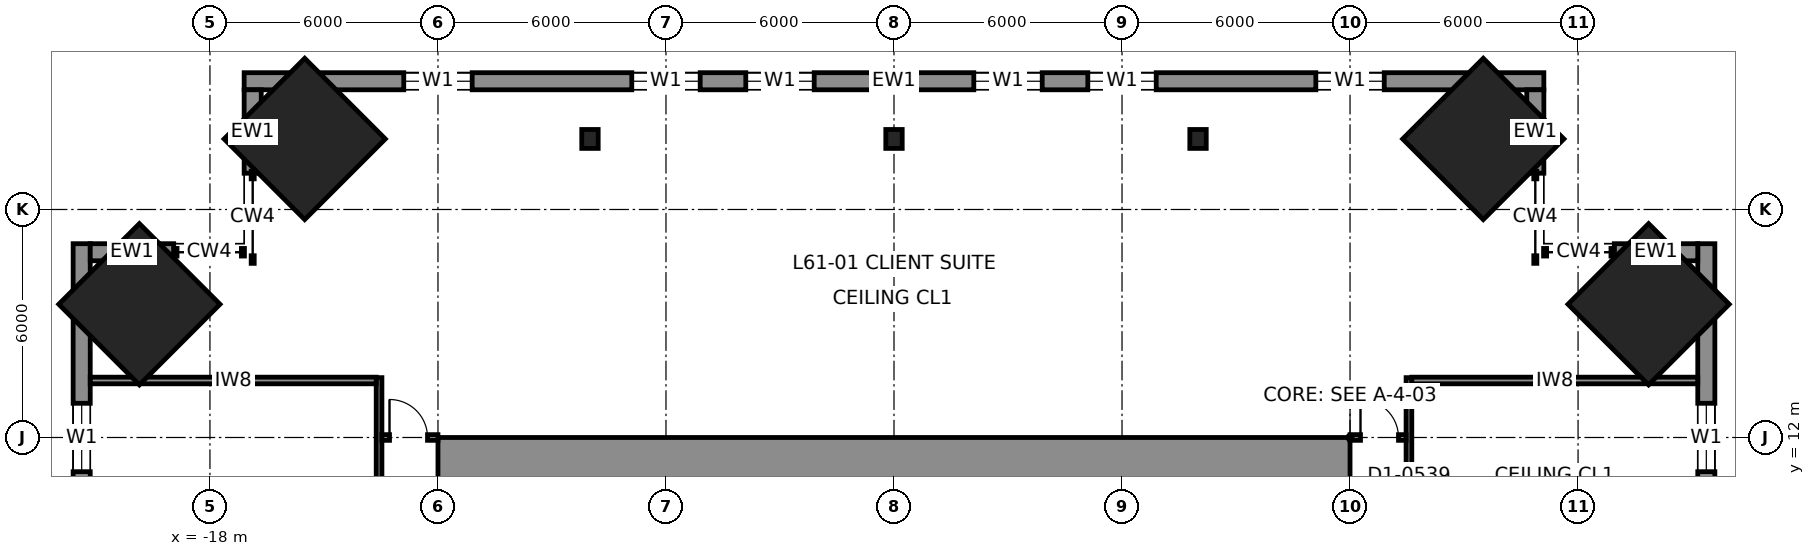
"""IFC4 building model, lengths in metres.
Left out: names, types, materials, properties, quantities, classifications, styles, units other than length and angle.
Written with IfcOpenShell. Run it as: python <this file> out.ifc"""

import sys

from ifc_helpers import new_model, si_unit, direction, frame, frame_2d, origin, origin_2d, place, context, subcontext, project, spatial, rectangle, i_section, extrude, element, fill, save


model = new_model("IFC4")
c1 = context("Model", 3, precision=1e-05, world=origin(), true_north=direction((0.0, 1.0)))
c2 = subcontext(c1, "Body", "Model", "MODEL_VIEW")
j1 = project(units=[si_unit("LENGTHUNIT", "METRE"), si_unit("PLANEANGLEUNIT", "RADIAN")], contexts=[c1])
p1 = place(None, origin())
s1 = spatial("IfcSite", under=j1, at=p1, CompositionType="ELEMENT")
p2 = place(p1, origin())
s2 = spatial("IfcBuilding", under=s1, at=p2, CompositionType="ELEMENT")
p3 = place(p2, frame((0.0, 0.0, 273.8)))
s3 = spatial("IfcBuildingStorey", under=s2, at=p3, CompositionType="ELEMENT", Elevation=273.8)
for number, where, z_axis, x_axis in (
    (1, (15.506, 19.856, 0.0), (-0.04, -0.04, 0.998), (0.708, -0.707, 0.0)),
    (2, (19.856, 15.506, 0.0), (-0.04, -0.04, 0.998), (0.707, -0.708, 0.0)),
    (3, (-19.856, 15.506, 0.0), (0.04, -0.04, 0.998), (0.707, 0.708, 0.0)),
    (4, (-15.506, 19.856, 0.0), (0.04, -0.04, 0.998), (0.708, 0.707, 0.0)),
):
    element("IfcColumn", number, at=place(p3, frame(where, z_axis=z_axis, x_axis=x_axis)), inside=s3, PredefinedType="COLUMN", context=c2, shape_type="SweptSolid", body=[
        extrude(rectangle(XDim=3.0, YDim=3.0, at=origin_2d()), origin(), (0.0, 0.0, 1.0), 4.007),
    ])
for number, where, z_axis, x_axis in (
    (5, (0.0, 19.856, 0.0), (0.0, -0.04, 0.999), (1.0, 0.0, 0.0)),
    (6, (8.0, 19.856, 0.0), (0.0, -0.04, 0.999), (1.0, 0.0, 0.0)),
    (7, (-8.0, 19.856, 0.0), (0.0, -0.04, 0.999), (1.0, 0.0, 0.0)),
):
    element("IfcColumn", number, at=place(p3, frame(where, z_axis=z_axis, x_axis=x_axis)), inside=s3, PredefinedType="COLUMN", context=c2, shape_type="SweptSolid", body=[
        extrude(i_section(OverallWidth=0.432, OverallDepth=0.498, WebThickness=0.056, FlangeThickness=0.089, at=origin_2d()), origin(), (0.0, 0.0, 1.0), 4.003),
    ])
p4 = place(p3, frame((-12.0, 11.25, 0.0), z_axis=(0.0, 0.0, 1.0), x_axis=(1.0, 0.0, 0.0)))
e8 = element("IfcWall", 8, at=p4, inside=s3, PredefinedType="SHEAR", context=c2, shape_type="SweptSolid", body=[
    extrude(rectangle(XDim=24.0, YDim=1.5, at=frame_2d((12.0, 0.0))), origin(), (0.0, 0.0, 1.0), 4.0),
])
p5 = place(p3, frame((17.1, 21.375, 0.0), z_axis=(0.0, 0.0, 1.0), x_axis=(-1.0, 0.0, 0.0)))
e9 = element("IfcWall", 9, at=p5, inside=s3, PredefinedType="SOLIDWALL", context=c2, shape_type="SweptSolid", body=[
    extrude(rectangle(XDim=34.2, YDim=0.45, at=frame_2d((17.1, 0.0))), origin(), (0.0, 0.0, 1.0), 3.83),
])
p6 = place(p5, frame((4.2, 0.0, 0.7)))
e10 = element("IfcOpeningElement", 10, at=p6, cuts=e9, PredefinedType="OPENING", context=c2, shape_type="SweptSolid", body=[
    extrude(rectangle(XDim=1.8, YDim=2.6, at=frame_2d((0.9, 1.3))), frame((0.0, 0.235, 0.0), z_axis=(0.0, -1.0, 0.0), x_axis=(1.0, 0.0, 0.0)), (0.0, 0.0, 1.0), 0.47),
])
p7 = place(p5, frame((10.2, 0.0, 0.7)))
e11 = element("IfcOpeningElement", 11, at=p7, cuts=e9, PredefinedType="OPENING", context=c2, shape_type="SweptSolid", body=[
    extrude(rectangle(XDim=1.8, YDim=2.6, at=frame_2d((0.9, 1.3))), frame((0.0, 0.235, 0.0), z_axis=(0.0, -1.0, 0.0), x_axis=(1.0, 0.0, 0.0)), (0.0, 0.0, 1.0), 0.47),
])
p8 = place(p5, frame((13.2, 0.0, 0.7)))
e12 = element("IfcOpeningElement", 12, at=p8, cuts=e9, PredefinedType="OPENING", context=c2, shape_type="SweptSolid", body=[
    extrude(rectangle(XDim=1.8, YDim=2.6, at=frame_2d((0.9, 1.3))), frame((0.0, 0.235, 0.0), z_axis=(0.0, -1.0, 0.0), x_axis=(1.0, 0.0, 0.0)), (0.0, 0.0, 1.0), 0.47),
])
p9 = place(p5, frame((19.2, 0.0, 0.7)))
e13 = element("IfcOpeningElement", 13, at=p9, cuts=e9, PredefinedType="OPENING", context=c2, shape_type="SweptSolid", body=[
    extrude(rectangle(XDim=1.8, YDim=2.6, at=frame_2d((0.9, 1.3))), frame((0.0, 0.235, 0.0), z_axis=(0.0, -1.0, 0.0), x_axis=(1.0, 0.0, 0.0)), (0.0, 0.0, 1.0), 0.47),
])
p10 = place(p5, frame((22.2, 0.0, 0.7)))
e14 = element("IfcOpeningElement", 14, at=p10, cuts=e9, PredefinedType="OPENING", context=c2, shape_type="SweptSolid", body=[
    extrude(rectangle(XDim=1.8, YDim=2.6, at=frame_2d((0.9, 1.3))), frame((0.0, 0.235, 0.0), z_axis=(0.0, -1.0, 0.0), x_axis=(1.0, 0.0, 0.0)), (0.0, 0.0, 1.0), 0.47),
])
p11 = place(p5, frame((28.2, 0.0, 0.7)))
e15 = element("IfcOpeningElement", 15, at=p11, cuts=e9, PredefinedType="OPENING", context=c2, shape_type="SweptSolid", body=[
    extrude(rectangle(XDim=1.8, YDim=2.6, at=frame_2d((0.9, 1.3))), frame((0.0, 0.235, 0.0), z_axis=(0.0, -1.0, 0.0), x_axis=(1.0, 0.0, 0.0)), (0.0, 0.0, 1.0), 0.47),
])
p12 = place(p3, frame((21.375, -17.1, 0.0), z_axis=(0.0, 0.0, 1.0), x_axis=(0.0, 1.0, 0.0)))
e16 = element("IfcWall", 16, at=p12, inside=s3, PredefinedType="SOLIDWALL", context=c2, shape_type="SweptSolid", body=[
    extrude(rectangle(XDim=34.2, YDim=0.45, at=frame_2d((17.1, 0.0))), origin(), (0.0, 0.0, 1.0), 3.83),
])
p13 = place(p12, frame((4.2, 0.0, 0.7)))
e17 = element("IfcOpeningElement", 17, at=p13, cuts=e16, PredefinedType="OPENING", context=c2, shape_type="SweptSolid", body=[
    extrude(rectangle(XDim=1.8, YDim=2.6, at=frame_2d((0.9, 1.3))), frame((0.0, 0.235, 0.0), z_axis=(0.0, -1.0, 0.0), x_axis=(1.0, 0.0, 0.0)), (0.0, 0.0, 1.0), 0.47),
])
p14 = place(p12, frame((10.2, 0.0, 0.7)))
e18 = element("IfcOpeningElement", 18, at=p14, cuts=e16, PredefinedType="OPENING", context=c2, shape_type="SweptSolid", body=[
    extrude(rectangle(XDim=1.8, YDim=2.6, at=frame_2d((0.9, 1.3))), frame((0.0, 0.235, 0.0), z_axis=(0.0, -1.0, 0.0), x_axis=(1.0, 0.0, 0.0)), (0.0, 0.0, 1.0), 0.47),
])
p15 = place(p12, frame((13.2, 0.0, 0.7)))
e19 = element("IfcOpeningElement", 19, at=p15, cuts=e16, PredefinedType="OPENING", context=c2, shape_type="SweptSolid", body=[
    extrude(rectangle(XDim=1.8, YDim=2.6, at=frame_2d((0.9, 1.3))), frame((0.0, 0.235, 0.0), z_axis=(0.0, -1.0, 0.0), x_axis=(1.0, 0.0, 0.0)), (0.0, 0.0, 1.0), 0.47),
])
p16 = place(p12, frame((19.2, 0.0, 0.7)))
e20 = element("IfcOpeningElement", 20, at=p16, cuts=e16, PredefinedType="OPENING", context=c2, shape_type="SweptSolid", body=[
    extrude(rectangle(XDim=1.8, YDim=2.6, at=frame_2d((0.9, 1.3))), frame((0.0, 0.235, 0.0), z_axis=(0.0, -1.0, 0.0), x_axis=(1.0, 0.0, 0.0)), (0.0, 0.0, 1.0), 0.47),
])
p17 = place(p12, frame((22.2, 0.0, 0.7)))
e21 = element("IfcOpeningElement", 21, at=p17, cuts=e16, PredefinedType="OPENING", context=c2, shape_type="SweptSolid", body=[
    extrude(rectangle(XDim=1.8, YDim=2.6, at=frame_2d((0.9, 1.3))), frame((0.0, 0.235, 0.0), z_axis=(0.0, -1.0, 0.0), x_axis=(1.0, 0.0, 0.0)), (0.0, 0.0, 1.0), 0.47),
])
p18 = place(p12, frame((28.2, 0.0, 0.7)))
e22 = element("IfcOpeningElement", 22, at=p18, cuts=e16, PredefinedType="OPENING", context=c2, shape_type="SweptSolid", body=[
    extrude(rectangle(XDim=1.8, YDim=2.6, at=frame_2d((0.9, 1.3))), frame((0.0, 0.235, 0.0), z_axis=(0.0, -1.0, 0.0), x_axis=(1.0, 0.0, 0.0)), (0.0, 0.0, 1.0), 0.47),
])
p19 = place(p3, frame((-21.375, 17.1, 0.0), z_axis=(0.0, 0.0, 1.0), x_axis=(0.0, -1.0, 0.0)))
e23 = element("IfcWall", 23, at=p19, inside=s3, PredefinedType="SOLIDWALL", context=c2, shape_type="SweptSolid", body=[
    extrude(rectangle(XDim=34.2, YDim=0.45, at=frame_2d((17.1, 0.0))), origin(), (0.0, 0.0, 1.0), 3.83),
])
p20 = place(p19, frame((4.2, 0.0, 0.7)))
e24 = element("IfcOpeningElement", 24, at=p20, cuts=e23, PredefinedType="OPENING", context=c2, shape_type="SweptSolid", body=[
    extrude(rectangle(XDim=1.8, YDim=2.6, at=frame_2d((0.9, 1.3))), frame((0.0, 0.235, 0.0), z_axis=(0.0, -1.0, 0.0), x_axis=(1.0, 0.0, 0.0)), (0.0, 0.0, 1.0), 0.47),
])
p21 = place(p19, frame((10.2, 0.0, 0.7)))
e25 = element("IfcOpeningElement", 25, at=p21, cuts=e23, PredefinedType="OPENING", context=c2, shape_type="SweptSolid", body=[
    extrude(rectangle(XDim=1.8, YDim=2.6, at=frame_2d((0.9, 1.3))), frame((0.0, 0.235, 0.0), z_axis=(0.0, -1.0, 0.0), x_axis=(1.0, 0.0, 0.0)), (0.0, 0.0, 1.0), 0.47),
])
p22 = place(p19, frame((13.2, 0.0, 0.7)))
e26 = element("IfcOpeningElement", 26, at=p22, cuts=e23, PredefinedType="OPENING", context=c2, shape_type="SweptSolid", body=[
    extrude(rectangle(XDim=1.8, YDim=2.6, at=frame_2d((0.9, 1.3))), frame((0.0, 0.235, 0.0), z_axis=(0.0, -1.0, 0.0), x_axis=(1.0, 0.0, 0.0)), (0.0, 0.0, 1.0), 0.47),
])
p23 = place(p19, frame((19.2, 0.0, 0.7)))
e27 = element("IfcOpeningElement", 27, at=p23, cuts=e23, PredefinedType="OPENING", context=c2, shape_type="SweptSolid", body=[
    extrude(rectangle(XDim=1.8, YDim=2.6, at=frame_2d((0.9, 1.3))), frame((0.0, 0.235, 0.0), z_axis=(0.0, -1.0, 0.0), x_axis=(1.0, 0.0, 0.0)), (0.0, 0.0, 1.0), 0.47),
])
p24 = place(p19, frame((22.2, 0.0, 0.7)))
e28 = element("IfcOpeningElement", 28, at=p24, cuts=e23, PredefinedType="OPENING", context=c2, shape_type="SweptSolid", body=[
    extrude(rectangle(XDim=1.8, YDim=2.6, at=frame_2d((0.9, 1.3))), frame((0.0, 0.235, 0.0), z_axis=(0.0, -1.0, 0.0), x_axis=(1.0, 0.0, 0.0)), (0.0, 0.0, 1.0), 0.47),
])
p25 = place(p19, frame((28.2, 0.0, 0.7)))
e29 = element("IfcOpeningElement", 29, at=p25, cuts=e23, PredefinedType="OPENING", context=c2, shape_type="SweptSolid", body=[
    extrude(rectangle(XDim=1.8, YDim=2.6, at=frame_2d((0.9, 1.3))), frame((0.0, 0.235, 0.0), z_axis=(0.0, -1.0, 0.0), x_axis=(1.0, 0.0, 0.0)), (0.0, 0.0, 1.0), 0.47),
])
for number, where, z_axis, x_axis in (
    (30, (16.875, 18.954, 0.0), (0.0, 0.0, 1.0), (0.0, 1.0, 0.0)),
    (31, (18.954, 16.875, 0.0), (0.0, 0.0, 1.0), (1.0, 0.0, 0.0)),
    (32, (-16.875, 18.954, 0.0), (0.0, 0.0, 1.0), (0.0, 1.0, 0.0)),
    (33, (-18.954, 16.875, 0.0), (0.0, 0.0, 1.0), (-1.0, 0.0, 0.0)),
):
    element("IfcWall", number, at=place(p3, frame(where, z_axis=z_axis, x_axis=x_axis)), inside=s3, PredefinedType="SOLIDWALL", context=c2, shape_type="SweptSolid", body=[
        extrude(rectangle(XDim=2.196, YDim=0.45, at=frame_2d((1.098, 0.0))), origin(), (0.0, 0.0, 1.0), 3.83),
    ])
p26 = place(p3, frame((13.55, -13.575, 0.0), z_axis=(0.0, 0.0, 1.0), x_axis=(0.0, 1.0, 0.0)))
e34 = element("IfcWall", 34, at=p26, inside=s3, PredefinedType="PARTITIONING", context=c2, shape_type="SweptSolid", body=[
    extrude(rectangle(XDim=27.15, YDim=0.15, at=frame_2d((13.575, 0.0))), origin(), (0.0, 0.0, 1.0), 3.83),
])
p27 = place(p26, frame((3.175, 0.0, 0.0)))
e35 = element("IfcOpeningElement", 35, at=p27, cuts=e34, PredefinedType="OPENING", context=c2, shape_type="SweptSolid", body=[
    extrude(rectangle(XDim=1.0, YDim=2.3, at=frame_2d((0.5, 1.15))), frame((0.0, 0.085, 0.0), z_axis=(0.0, -1.0, 0.0), x_axis=(1.0, 0.0, 0.0)), (0.0, 0.0, 1.0), 0.17),
])
p28 = place(p26, frame((6.625, 0.0, 0.0)))
e36 = element("IfcOpeningElement", 36, at=p28, cuts=e34, PredefinedType="OPENING", context=c2, shape_type="SweptSolid", body=[
    extrude(rectangle(XDim=1.0, YDim=2.3, at=frame_2d((0.5, 1.15))), frame((0.0, 0.085, 0.0), z_axis=(0.0, -1.0, 0.0), x_axis=(1.0, 0.0, 0.0)), (0.0, 0.0, 1.0), 0.17),
])
p29 = place(p26, frame((17.075, 0.0, 0.0)))
e37 = element("IfcOpeningElement", 37, at=p29, cuts=e34, PredefinedType="OPENING", context=c2, shape_type="SweptSolid", body=[
    extrude(rectangle(XDim=1.0, YDim=2.3, at=frame_2d((0.5, 1.15))), frame((0.0, 0.085, 0.0), z_axis=(0.0, -1.0, 0.0), x_axis=(1.0, 0.0, 0.0)), (0.0, 0.0, 1.0), 0.17),
])
p30 = place(p26, frame((22.975, 0.0, 0.0)))
e38 = element("IfcOpeningElement", 38, at=p30, cuts=e34, PredefinedType="OPENING", context=c2, shape_type="SweptSolid", body=[
    extrude(rectangle(XDim=1.0, YDim=2.3, at=frame_2d((0.5, 1.15))), frame((0.0, 0.085, 0.0), z_axis=(0.0, -1.0, 0.0), x_axis=(1.0, 0.0, 0.0)), (0.0, 0.0, 1.0), 0.17),
])
p31 = place(p26, frame((9.825, 0.0, 0.0)))
e39 = element("IfcOpeningElement", 39, at=p31, cuts=e34, PredefinedType="OPENING", context=c2, shape_type="SweptSolid", body=[
    extrude(rectangle(XDim=1.0, YDim=2.3, at=frame_2d((0.5, 1.15))), frame((0.0, 0.085, 0.0), z_axis=(0.0, -1.0, 0.0), x_axis=(1.0, 0.0, 0.0)), (0.0, 0.0, 1.0), 0.17),
])
p32 = place(p3, frame((-13.55, 13.575, 0.0), z_axis=(0.0, 0.0, 1.0), x_axis=(0.0, -1.0, 0.0)))
e40 = element("IfcWall", 40, at=p32, inside=s3, PredefinedType="PARTITIONING", context=c2, shape_type="SweptSolid", body=[
    extrude(rectangle(XDim=27.15, YDim=0.15, at=frame_2d((13.575, 0.0))), origin(), (0.0, 0.0, 1.0), 3.83),
])
p33 = place(p32, frame((21.225, 0.0, 0.0)))
e41 = element("IfcOpeningElement", 41, at=p33, cuts=e40, PredefinedType="OPENING", context=c2, shape_type="SweptSolid", body=[
    extrude(rectangle(XDim=1.4, YDim=2.3, at=frame_2d((0.7, 1.15))), frame((0.0, 0.085, 0.0), z_axis=(0.0, -1.0, 0.0), x_axis=(1.0, 0.0, 0.0)), (0.0, 0.0, 1.0), 0.17),
])
p34 = place(p32, frame((9.075, 0.0, 0.0)))
e42 = element("IfcOpeningElement", 42, at=p34, cuts=e40, PredefinedType="OPENING", context=c2, shape_type="SweptSolid", body=[
    extrude(rectangle(XDim=1.0, YDim=2.3, at=frame_2d((0.5, 1.15))), frame((0.0, 0.085, 0.0), z_axis=(0.0, -1.0, 0.0), x_axis=(1.0, 0.0, 0.0)), (0.0, 0.0, 1.0), 0.17),
])
p35 = place(p32, frame((16.575, 0.0, 0.0)))
e43 = element("IfcOpeningElement", 43, at=p35, cuts=e40, PredefinedType="OPENING", context=c2, shape_type="SweptSolid", body=[
    extrude(rectangle(XDim=1.0, YDim=2.3, at=frame_2d((0.5, 1.15))), frame((0.0, 0.085, 0.0), z_axis=(0.0, -1.0, 0.0), x_axis=(1.0, 0.0, 0.0)), (0.0, 0.0, 1.0), 0.17),
])
p36 = place(p3, frame((12.0, 12.0, 0.0), z_axis=(0.0, 0.0, 1.0), x_axis=(1.0, 0.0, 0.0)))
e44 = element("IfcWall", 44, at=p36, inside=s3, PredefinedType="PARTITIONING", context=c2, shape_type="SweptSolid", body=[
    extrude(rectangle(XDim=1.475, YDim=0.15, at=frame_2d((0.738, 0.0))), origin(), (0.0, 0.0, 1.0), 3.83),
])
p37 = place(p36, frame((0.275, 0.0, 0.0)))
e45 = element("IfcOpeningElement", 45, at=p37, cuts=e44, PredefinedType="OPENING", context=c2, shape_type="SweptSolid", body=[
    extrude(rectangle(XDim=1.0, YDim=2.3, at=frame_2d((0.5, 1.15))), frame((0.0, 0.085, 0.0), z_axis=(0.0, -1.0, 0.0), x_axis=(1.0, 0.0, 0.0)), (0.0, 0.0, 1.0), 0.17),
])
p38 = place(p3, frame((-13.475, 12.0, 0.0), z_axis=(0.0, 0.0, 1.0), x_axis=(1.0, 0.0, 0.0)))
e46 = element("IfcWall", 46, at=p38, inside=s3, PredefinedType="PARTITIONING", context=c2, shape_type="SweptSolid", body=[
    extrude(rectangle(XDim=1.475, YDim=0.15, at=frame_2d((0.738, 0.0))), origin(), (0.0, 0.0, 1.0), 3.83),
])
p39 = place(p38, frame((0.2, 0.0, 0.0)))
e47 = element("IfcOpeningElement", 47, at=p39, cuts=e46, PredefinedType="OPENING", context=c2, shape_type="SweptSolid", body=[
    extrude(rectangle(XDim=1.0, YDim=2.3, at=frame_2d((0.5, 1.15))), frame((0.0, 0.085, 0.0), z_axis=(0.0, -1.0, 0.0), x_axis=(1.0, 0.0, 0.0)), (0.0, 0.0, 1.0), 0.17),
])
for number, where, z_axis, x_axis in (
    (48, (13.625, 13.5, 0.0), (0.0, 0.0, 1.0), (1.0, 0.0, 0.0)),
    (49, (-21.15, 13.5, 0.0), (0.0, 0.0, 1.0), (1.0, 0.0, 0.0)),
):
    element("IfcWall", number, at=place(p3, frame(where, z_axis=z_axis, x_axis=x_axis)), inside=s3, PredefinedType="PARTITIONING", context=c2, shape_type="SweptSolid", body=[
        extrude(rectangle(XDim=7.525, YDim=0.175, at=frame_2d((3.762, 0.0))), origin(), (0.0, 0.0, 1.0), 3.83),
    ])
p40 = place(p6, origin())
e50 = element("IfcWindow", 50, at=p40, inside=s3, PartitioningType="SINGLE_PANEL", PredefinedType="WINDOW", context=c2, shape_type="SweptSolid", body=[
    extrude(rectangle(XDim=1.8, YDim=2.6, at=frame_2d((0.9, 1.3))), frame((0.0, 0.03, 0.0), z_axis=(0.0, -1.0, 0.0), x_axis=(1.0, 0.0, 0.0)), (0.0, 0.0, 1.0), 0.06),
])
fill(e10, e50)
p41 = place(p7, origin())
e51 = element("IfcWindow", 51, at=p41, inside=s3, PartitioningType="SINGLE_PANEL", PredefinedType="WINDOW", context=c2, shape_type="SweptSolid", body=[
    extrude(rectangle(XDim=1.8, YDim=2.6, at=frame_2d((0.9, 1.3))), frame((0.0, 0.03, 0.0), z_axis=(0.0, -1.0, 0.0), x_axis=(1.0, 0.0, 0.0)), (0.0, 0.0, 1.0), 0.06),
])
fill(e11, e51)
p42 = place(p8, origin())
e52 = element("IfcWindow", 52, at=p42, inside=s3, PartitioningType="SINGLE_PANEL", PredefinedType="WINDOW", context=c2, shape_type="SweptSolid", body=[
    extrude(rectangle(XDim=1.8, YDim=2.6, at=frame_2d((0.9, 1.3))), frame((0.0, 0.03, 0.0), z_axis=(0.0, -1.0, 0.0), x_axis=(1.0, 0.0, 0.0)), (0.0, 0.0, 1.0), 0.06),
])
fill(e12, e52)
p43 = place(p9, origin())
e53 = element("IfcWindow", 53, at=p43, inside=s3, PartitioningType="SINGLE_PANEL", PredefinedType="WINDOW", context=c2, shape_type="SweptSolid", body=[
    extrude(rectangle(XDim=1.8, YDim=2.6, at=frame_2d((0.9, 1.3))), frame((0.0, 0.03, 0.0), z_axis=(0.0, -1.0, 0.0), x_axis=(1.0, 0.0, 0.0)), (0.0, 0.0, 1.0), 0.06),
])
fill(e13, e53)
p44 = place(p10, origin())
e54 = element("IfcWindow", 54, at=p44, inside=s3, PartitioningType="SINGLE_PANEL", PredefinedType="WINDOW", context=c2, shape_type="SweptSolid", body=[
    extrude(rectangle(XDim=1.8, YDim=2.6, at=frame_2d((0.9, 1.3))), frame((0.0, 0.03, 0.0), z_axis=(0.0, -1.0, 0.0), x_axis=(1.0, 0.0, 0.0)), (0.0, 0.0, 1.0), 0.06),
])
fill(e14, e54)
p45 = place(p11, origin())
e55 = element("IfcWindow", 55, at=p45, inside=s3, PartitioningType="SINGLE_PANEL", PredefinedType="WINDOW", context=c2, shape_type="SweptSolid", body=[
    extrude(rectangle(XDim=1.8, YDim=2.6, at=frame_2d((0.9, 1.3))), frame((0.0, 0.03, 0.0), z_axis=(0.0, -1.0, 0.0), x_axis=(1.0, 0.0, 0.0)), (0.0, 0.0, 1.0), 0.06),
])
fill(e15, e55)
p46 = place(p18, origin())
e56 = element("IfcWindow", 56, at=p46, inside=s3, PartitioningType="SINGLE_PANEL", PredefinedType="WINDOW", context=c2, shape_type="SweptSolid", body=[
    extrude(rectangle(XDim=1.8, YDim=2.6, at=frame_2d((0.9, 1.3))), frame((0.0, 0.03, 0.0), z_axis=(0.0, -1.0, 0.0), x_axis=(1.0, 0.0, 0.0)), (0.0, 0.0, 1.0), 0.06),
])
fill(e22, e56)
p47 = place(p20, origin())
e57 = element("IfcWindow", 57, at=p47, inside=s3, PartitioningType="SINGLE_PANEL", PredefinedType="WINDOW", context=c2, shape_type="SweptSolid", body=[
    extrude(rectangle(XDim=1.8, YDim=2.6, at=frame_2d((0.9, 1.3))), frame((0.0, 0.03, 0.0), z_axis=(0.0, -1.0, 0.0), x_axis=(1.0, 0.0, 0.0)), (0.0, 0.0, 1.0), 0.06),
])
fill(e24, e57)
p48 = place(p39, origin())
e58 = element("IfcDoor", 58, at=p48, inside=s3, OperationType="SINGLE_SWING_LEFT", PredefinedType="DOOR", context=c2, shape_type="SweptSolid", body=[
    extrude(rectangle(XDim=1.0, YDim=2.3, at=frame_2d((0.5, 1.15))), frame((0.0, 0.025, 0.0), z_axis=(0.0, -1.0, 0.0), x_axis=(1.0, 0.0, 0.0)), (0.0, 0.0, 1.0), 0.05),
])
fill(e47, e58)
p49 = place(p37, origin())
e59 = element("IfcDoor", 59, at=p49, inside=s3, OperationType="SINGLE_SWING_LEFT", PredefinedType="DOOR", context=c2, shape_type="SweptSolid", body=[
    extrude(rectangle(XDim=1.0, YDim=2.3, at=frame_2d((0.5, 1.15))), frame((0.0, 0.025, 0.0), z_axis=(0.0, -1.0, 0.0), x_axis=(1.0, 0.0, 0.0)), (0.0, 0.0, 1.0), 0.05),
])
fill(e45, e59)
save(model, sys.argv[1])
